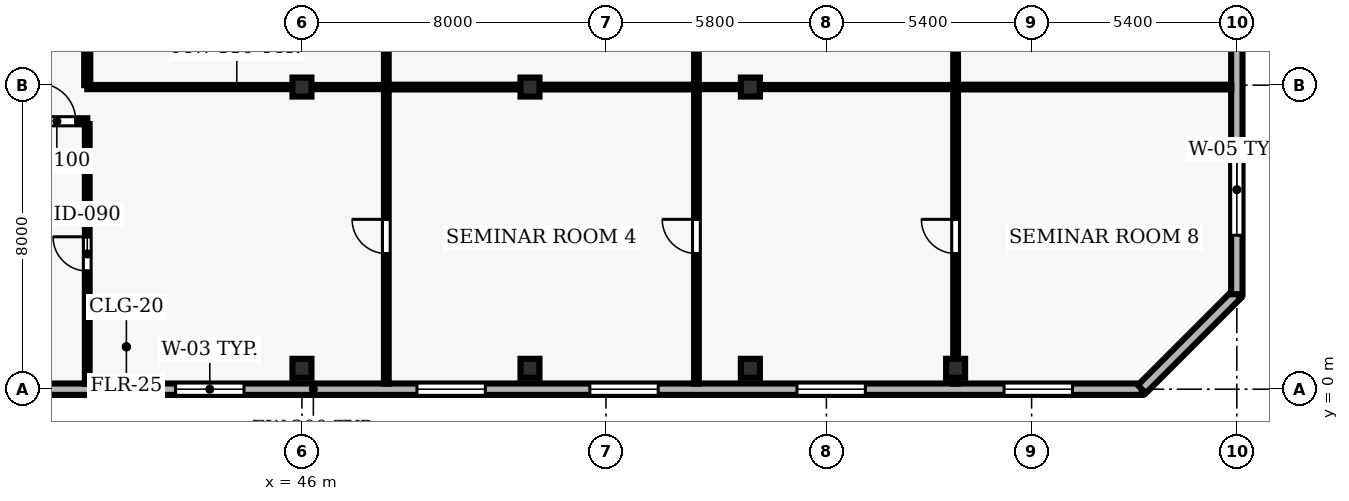
"""IFC4 building model, lengths in metres.
Left out: names, types, materials, properties, quantities, classifications, styles, units other than length and angle.
Written with IfcOpenShell. Run it as: python <this file> out.ifc"""

import sys

from ifc_helpers import new_model, si_unit, direction, frame, frame_2d, origin, origin_2d, place, context, subcontext, project, spatial, rectangle, hollow_rectangle, extrude, element, fill, save


model = new_model("IFC4")
c1 = context("Model", 3, precision=1e-05, world=origin(), true_north=direction((0.0, 1.0)))
c2 = subcontext(c1, "Body", "Model", "MODEL_VIEW")
j1 = project(units=[si_unit("LENGTHUNIT", "METRE"), si_unit("PLANEANGLEUNIT", "RADIAN")], contexts=[c1])
p1 = place(None, origin())
s1 = spatial("IfcSite", under=j1, at=p1, CompositionType="ELEMENT")
p2 = place(p1, origin())
s2 = spatial("IfcBuilding", under=s1, at=p2, CompositionType="ELEMENT")
p3 = place(p2, frame((0.0, 0.0, 158.0)))
s3 = spatial("IfcBuildingStorey", under=s2, at=p3, CompositionType="ELEMENT", Elevation=158.0)
for number, where, z_axis, x_axis in (
    (1, (46.0, 0.55, 0.0), (0.0, 0.0, 1.0), (1.0, 0.0, 0.0)),
    (2, (46.0, 7.95, 0.0), (0.0, 0.0, 1.0), (1.0, 0.0, 0.0)),
    (3, (52.0, 0.55, 0.0), (0.0, 0.0, 1.0), (1.0, 0.0, 0.0)),
    (4, (52.0, 7.95, 0.0), (0.0, 0.0, 1.0), (1.0, 0.0, 0.0)),
    (5, (57.8, 0.55, 0.0), (0.0, 0.0, 1.0), (1.0, 0.0, 0.0)),
    (6, (57.8, 7.95, 0.0), (0.0, 0.0, 1.0), (1.0, 0.0, 0.0)),
    (7, (63.2, 0.55, 0.0), (0.0, 0.0, 1.0), (1.0, 0.0, 0.0)),
):
    element("IfcColumn", number, at=place(p3, frame(where, z_axis=z_axis, x_axis=x_axis)), inside=s3, PredefinedType="COLUMN", context=c2, shape_type="SweptSolid", body=[
        extrude(hollow_rectangle(XDim=0.5, YDim=0.5, WallThickness=0.025, at=origin_2d()), origin(), (0.0, 0.0, 1.0), 3.9),
    ])
p4 = place(p3, frame((24.5, 0.0, 0.0), z_axis=(0.0, 0.0, 1.0), x_axis=(1.0, 0.0, 0.0)))
e8 = element("IfcWall", 8, at=p4, inside=s3, PredefinedType="SOLIDWALL", context=c2, shape_type="SweptSolid", body=[
    extrude(rectangle(XDim=43.6, YDim=0.3, at=frame_2d((21.8, 0.0))), origin(), (0.0, 0.0, 1.0), 3.69),
])
p5 = place(p4, frame((1.825, 0.0, 0.9)))
e9 = element("IfcOpeningElement", 9, at=p5, cuts=e8, PredefinedType="OPENING", context=c2, shape_type="SweptSolid", body=[
    extrude(rectangle(XDim=1.8, YDim=1.6, at=frame_2d((0.9, 0.8))), frame((0.0, 0.16, 0.0), z_axis=(0.0, -1.0, 0.0), x_axis=(1.0, 0.0, 0.0)), (0.0, 0.0, 1.0), 0.32),
])
p6 = place(p4, frame((8.175, 0.0, 0.9)))
e10 = element("IfcOpeningElement", 10, at=p6, cuts=e8, PredefinedType="OPENING", context=c2, shape_type="SweptSolid", body=[
    extrude(rectangle(XDim=1.8, YDim=1.6, at=frame_2d((0.9, 0.8))), frame((0.0, 0.16, 0.0), z_axis=(0.0, -1.0, 0.0), x_axis=(1.0, 0.0, 0.0)), (0.0, 0.0, 1.0), 0.32),
])
p7 = place(p4, frame((18.175, 0.0, 0.9)))
e11 = element("IfcOpeningElement", 11, at=p7, cuts=e8, PredefinedType="OPENING", context=c2, shape_type="SweptSolid", body=[
    extrude(rectangle(XDim=1.8, YDim=1.6, at=frame_2d((0.9, 0.8))), frame((0.0, 0.16, 0.0), z_axis=(0.0, -1.0, 0.0), x_axis=(1.0, 0.0, 0.0)), (0.0, 0.0, 1.0), 0.32),
])
p8 = place(p4, frame((24.525, 0.0, 0.9)))
e12 = element("IfcOpeningElement", 12, at=p8, cuts=e8, PredefinedType="OPENING", context=c2, shape_type="SweptSolid", body=[
    extrude(rectangle(XDim=1.8, YDim=1.6, at=frame_2d((0.9, 0.8))), frame((0.0, 0.16, 0.0), z_axis=(0.0, -1.0, 0.0), x_axis=(1.0, 0.0, 0.0)), (0.0, 0.0, 1.0), 0.32),
])
p9 = place(p4, frame((29.075, 0.0, 0.9)))
e13 = element("IfcOpeningElement", 13, at=p9, cuts=e8, PredefinedType="OPENING", context=c2, shape_type="SweptSolid", body=[
    extrude(rectangle(XDim=1.8, YDim=1.6, at=frame_2d((0.9, 0.8))), frame((0.0, 0.16, 0.0), z_axis=(0.0, -1.0, 0.0), x_axis=(1.0, 0.0, 0.0)), (0.0, 0.0, 1.0), 0.32),
])
p10 = place(p4, frame((34.525, 0.0, 0.9)))
e14 = element("IfcOpeningElement", 14, at=p10, cuts=e8, PredefinedType="OPENING", context=c2, shape_type="SweptSolid", body=[
    extrude(rectangle(XDim=1.8, YDim=1.6, at=frame_2d((0.9, 0.8))), frame((0.0, 0.16, 0.0), z_axis=(0.0, -1.0, 0.0), x_axis=(1.0, 0.0, 0.0)), (0.0, 0.0, 1.0), 0.32),
])
p11 = place(p4, frame((39.975, 0.0, 0.9)))
e15 = element("IfcOpeningElement", 15, at=p11, cuts=e8, PredefinedType="OPENING", context=c2, shape_type="SweptSolid", body=[
    extrude(rectangle(XDim=1.8, YDim=1.6, at=frame_2d((0.9, 0.8))), frame((0.0, 0.16, 0.0), z_axis=(0.0, -1.0, 0.0), x_axis=(1.0, 0.0, 0.0)), (0.0, 0.0, 1.0), 0.32),
])
p12 = place(p3, frame((68.1, 0.0, 0.0), z_axis=(0.0, 0.0, 1.0), x_axis=(0.707106781187, 0.707106781187, 0.0)))
e16 = element("IfcWall", 16, at=p12, inside=s3, PredefinedType="SOLIDWALL", context=c2, shape_type="SweptSolid", body=[
    extrude(rectangle(XDim=3.536, YDim=0.3, at=frame_2d((1.768, 0.0))), origin(), (0.0, 0.0, 1.0), 3.69),
])
p13 = place(p3, frame((70.6, 2.5, 0.0), z_axis=(0.0, 0.0, 1.0), x_axis=(0.0, 1.0, 0.0)))
e17 = element("IfcWall", 17, at=p13, inside=s3, PredefinedType="SOLIDWALL", context=c2, shape_type="SweptSolid", body=[
    extrude(rectangle(XDim=11.0, YDim=0.3, at=frame_2d((5.5, 0.0))), origin(), (0.0, 0.0, 1.0), 3.69),
])
p14 = place(p13, frame((1.55, 0.0, 0.9)))
e18 = element("IfcOpeningElement", 18, at=p14, cuts=e17, PredefinedType="OPENING", context=c2, shape_type="SweptSolid", body=[
    extrude(rectangle(XDim=2.4, YDim=1.6, at=frame_2d((1.2, 0.8))), frame((0.0, 0.16, 0.0), z_axis=(0.0, -1.0, 0.0), x_axis=(1.0, 0.0, 0.0)), (0.0, 0.0, 1.0), 0.32),
])
p15 = place(p13, frame((7.05, 0.0, 0.9)))
e19 = element("IfcOpeningElement", 19, at=p15, cuts=e17, PredefinedType="OPENING", context=c2, shape_type="SweptSolid", body=[
    extrude(rectangle(XDim=2.4, YDim=1.6, at=frame_2d((1.2, 0.8))), frame((0.0, 0.16, 0.0), z_axis=(0.0, -1.0, 0.0), x_axis=(1.0, 0.0, 0.0)), (0.0, 0.0, 1.0), 0.32),
])
p16 = place(p3, frame((38.05, 7.05, 0.0), z_axis=(0.0, 0.0, 1.0), x_axis=(1.0, 0.0, 0.0)))
e20 = element("IfcWall", 20, at=p16, inside=s3, PredefinedType="PARTITIONING", context=c2, shape_type="SweptSolid", body=[
    extrude(rectangle(XDim=2.3, YDim=0.16, at=frame_2d((1.15, 0.0))), origin(), (0.0, 0.0, 1.0), 3.69),
])
p17 = place(p16, frame((1.0, 0.0, 0.0)))
e21 = element("IfcOpeningElement", 21, at=p17, cuts=e20, PredefinedType="OPENING", context=c2, shape_type="SweptSolid", body=[
    extrude(rectangle(XDim=1.0, YDim=2.1, at=frame_2d((0.5, 1.05))), frame((0.0, 0.09, 0.0), z_axis=(0.0, -1.0, 0.0), x_axis=(1.0, 0.0, 0.0)), (0.0, 0.0, 1.0), 0.18),
])
p18 = place(p3, frame((48.22, 7.95, 0.0), z_axis=(0.0, 0.0, 1.0), x_axis=(-1.0, 0.0, 0.0)))
e22 = element("IfcWall", 22, at=p18, inside=s3, PredefinedType="MOVABLE", context=c2, shape_type="SweptSolid", body=[
    extrude(rectangle(XDim=7.87, YDim=0.11, at=frame_2d((3.935, 0.0))), origin(), (0.0, 0.0, 1.0), 3.074),
])
p19 = place(p3, frame((56.38, 7.95, 0.0), z_axis=(0.0, 0.0, 1.0), x_axis=(-1.0, 0.0, 0.0)))
e23 = element("IfcWall", 23, at=p19, inside=s3, PredefinedType="PARTITIONING", context=c2, shape_type="SweptSolid", body=[
    extrude(rectangle(XDim=8.16, YDim=0.125, at=frame_2d((4.08, 0.0))), origin(), (0.0, 0.0, 1.0), 3.074),
])
p20 = place(p3, frame((63.2, 7.95, 0.0), z_axis=(0.0, 0.0, 1.0), x_axis=(-1.0, 0.0, 0.0)))
e24 = element("IfcWall", 24, at=p20, inside=s3, PredefinedType="MOVABLE", context=c2, shape_type="SweptSolid", body=[
    extrude(rectangle(XDim=6.82, YDim=0.11, at=frame_2d((3.41, 0.0))), origin(), (0.0, 0.0, 1.0), 3.074),
])
p21 = place(p3, frame((70.455, 7.95, 0.0), z_axis=(0.0, 0.0, 1.0), x_axis=(-1.0, 0.0, 0.0)))
e25 = element("IfcWall", 25, at=p21, inside=s3, PredefinedType="PARTITIONING", context=c2, shape_type="SweptSolid", body=[
    extrude(rectangle(XDim=7.255, YDim=0.125, at=frame_2d((3.627, 0.0))), origin(), (0.0, 0.0, 1.0), 3.69),
])
p22 = place(p3, frame((40.35, 0.145, 0.0), z_axis=(0.0, 0.0, 1.0), x_axis=(0.0, 1.0, 0.0)))
e26 = element("IfcWall", 26, at=p22, inside=s3, PredefinedType="PARTITIONING", context=c2, shape_type="SweptSolid", body=[
    extrude(rectangle(XDim=6.83, YDim=0.125, at=frame_2d((3.415, 0.0))), origin(), (0.0, 0.0, 1.0), 3.69),
])
p23 = place(p22, frame((2.965, 0.0, 0.0)))
e27 = element("IfcOpeningElement", 27, at=p23, cuts=e26, PredefinedType="OPENING", context=c2, shape_type="SweptSolid", body=[
    extrude(rectangle(XDim=0.9, YDim=2.1, at=frame_2d((0.45, 1.05))), frame((0.0, 0.073, 0.0), z_axis=(0.0, -1.0, 0.0), x_axis=(1.0, 0.0, 0.0)), (0.0, 0.0, 1.0), 0.145),
])
p24 = place(p3, frame((40.35, 8.0, 0.0), z_axis=(0.0, 0.0, 1.0), x_axis=(0.0, 1.0, 0.0)))
e28 = element("IfcWall", 28, at=p24, inside=s3, PredefinedType="PARTITIONING", context=c2, shape_type="SweptSolid", body=[
    extrude(rectangle(XDim=5.575, YDim=0.16, at=frame_2d((2.788, 0.0))), origin(), (0.0, 0.0, 1.0), 3.69),
])
p25 = place(p3, frame((48.22, 0.145, 0.0), z_axis=(0.0, 0.0, 1.0), x_axis=(0.0, 1.0, 0.0)))
e29 = element("IfcWall", 29, at=p25, inside=s3, PredefinedType="PARTITIONING", context=c2, shape_type="SweptSolid", body=[
    extrude(rectangle(XDim=7.748, YDim=0.125, at=frame_2d((3.874, 0.0))), origin(), (0.0, 0.0, 1.0), 3.69),
])
p26 = place(p25, frame((3.424, 0.0, 0.0)))
e30 = element("IfcOpeningElement", 30, at=p26, cuts=e29, PredefinedType="OPENING", context=c2, shape_type="SweptSolid", body=[
    extrude(rectangle(XDim=0.9, YDim=2.1, at=frame_2d((0.45, 1.05))), frame((0.0, 0.073, 0.0), z_axis=(0.0, -1.0, 0.0), x_axis=(1.0, 0.0, 0.0)), (0.0, 0.0, 1.0), 0.145),
])
p27 = place(p3, frame((48.22, 8.008, 0.0), z_axis=(0.0, 0.0, 1.0), x_axis=(0.0, 1.0, 0.0)))
e31 = element("IfcWall", 31, at=p27, inside=s3, PredefinedType="PARTITIONING", context=c2, shape_type="SweptSolid", body=[
    extrude(rectangle(XDim=5.567, YDim=0.125, at=frame_2d((2.783, 0.0))), origin(), (0.0, 0.0, 1.0), 3.69),
])
p28 = place(p3, frame((56.38, 0.145, 0.0), z_axis=(0.0, 0.0, 1.0), x_axis=(0.0, 1.0, 0.0)))
e32 = element("IfcWall", 32, at=p28, inside=s3, PredefinedType="PARTITIONING", context=c2, shape_type="SweptSolid", body=[
    extrude(rectangle(XDim=7.748, YDim=0.125, at=frame_2d((3.874, 0.0))), origin(), (0.0, 0.0, 1.0), 3.69),
])
p29 = place(p28, frame((3.424, 0.0, 0.0)))
e33 = element("IfcOpeningElement", 33, at=p29, cuts=e32, PredefinedType="OPENING", context=c2, shape_type="SweptSolid", body=[
    extrude(rectangle(XDim=0.9, YDim=2.1, at=frame_2d((0.45, 1.05))), frame((0.0, 0.073, 0.0), z_axis=(0.0, -1.0, 0.0), x_axis=(1.0, 0.0, 0.0)), (0.0, 0.0, 1.0), 0.145),
])
p30 = place(p3, frame((56.38, 8.008, 0.0), z_axis=(0.0, 0.0, 1.0), x_axis=(0.0, 1.0, 0.0)))
e34 = element("IfcWall", 34, at=p30, inside=s3, PredefinedType="PARTITIONING", context=c2, shape_type="SweptSolid", body=[
    extrude(rectangle(XDim=5.567, YDim=0.125, at=frame_2d((2.783, 0.0))), origin(), (0.0, 0.0, 1.0), 3.69),
])
p31 = place(p3, frame((63.2, 0.145, 0.0), z_axis=(0.0, 0.0, 1.0), x_axis=(0.0, 1.0, 0.0)))
e35 = element("IfcWall", 35, at=p31, inside=s3, PredefinedType="PARTITIONING", context=c2, shape_type="SweptSolid", body=[
    extrude(rectangle(XDim=7.748, YDim=0.125, at=frame_2d((3.874, 0.0))), origin(), (0.0, 0.0, 1.0), 3.074),
])
p32 = place(p31, frame((3.424, 0.0, 0.0)))
e36 = element("IfcOpeningElement", 36, at=p32, cuts=e35, PredefinedType="OPENING", context=c2, shape_type="SweptSolid", body=[
    extrude(rectangle(XDim=0.9, YDim=2.1, at=frame_2d((0.45, 1.05))), frame((0.0, 0.073, 0.0), z_axis=(0.0, -1.0, 0.0), x_axis=(1.0, 0.0, 0.0)), (0.0, 0.0, 1.0), 0.145),
])
p33 = place(p3, frame((63.2, 8.008, 0.0), z_axis=(0.0, 0.0, 1.0), x_axis=(0.0, 1.0, 0.0)))
e37 = element("IfcWall", 37, at=p33, inside=s3, PredefinedType="PARTITIONING", context=c2, shape_type="SweptSolid", body=[
    extrude(rectangle(XDim=5.567, YDim=0.125, at=frame_2d((2.783, 0.0))), origin(), (0.0, 0.0, 1.0), 3.074),
])
p34 = place(p7, origin())
e38 = element("IfcWindow", 38, at=p34, inside=s3, PartitioningType="SINGLE_PANEL", PredefinedType="WINDOW", context=c2, shape_type="SweptSolid", body=[
    extrude(rectangle(XDim=1.8, YDim=1.6, at=frame_2d((0.9, 0.8))), frame((0.0, 0.03, 0.0), z_axis=(0.0, -1.0, 0.0), x_axis=(1.0, 0.0, 0.0)), (0.0, 0.0, 1.0), 0.06),
])
fill(e11, e38)
p35 = place(p8, origin())
e39 = element("IfcWindow", 39, at=p35, inside=s3, PartitioningType="SINGLE_PANEL", PredefinedType="WINDOW", context=c2, shape_type="SweptSolid", body=[
    extrude(rectangle(XDim=1.8, YDim=1.6, at=frame_2d((0.9, 0.8))), frame((0.0, 0.03, 0.0), z_axis=(0.0, -1.0, 0.0), x_axis=(1.0, 0.0, 0.0)), (0.0, 0.0, 1.0), 0.06),
])
fill(e12, e39)
p36 = place(p9, origin())
e40 = element("IfcWindow", 40, at=p36, inside=s3, PartitioningType="SINGLE_PANEL", PredefinedType="WINDOW", context=c2, shape_type="SweptSolid", body=[
    extrude(rectangle(XDim=1.8, YDim=1.6, at=frame_2d((0.9, 0.8))), frame((0.0, 0.03, 0.0), z_axis=(0.0, -1.0, 0.0), x_axis=(1.0, 0.0, 0.0)), (0.0, 0.0, 1.0), 0.06),
])
fill(e13, e40)
p37 = place(p10, origin())
e41 = element("IfcWindow", 41, at=p37, inside=s3, PartitioningType="SINGLE_PANEL", PredefinedType="WINDOW", context=c2, shape_type="SweptSolid", body=[
    extrude(rectangle(XDim=1.8, YDim=1.6, at=frame_2d((0.9, 0.8))), frame((0.0, 0.03, 0.0), z_axis=(0.0, -1.0, 0.0), x_axis=(1.0, 0.0, 0.0)), (0.0, 0.0, 1.0), 0.06),
])
fill(e14, e41)
p38 = place(p11, origin())
e42 = element("IfcWindow", 42, at=p38, inside=s3, PartitioningType="SINGLE_PANEL", PredefinedType="WINDOW", context=c2, shape_type="SweptSolid", body=[
    extrude(rectangle(XDim=1.8, YDim=1.6, at=frame_2d((0.9, 0.8))), frame((0.0, 0.03, 0.0), z_axis=(0.0, -1.0, 0.0), x_axis=(1.0, 0.0, 0.0)), (0.0, 0.0, 1.0), 0.06),
])
fill(e15, e42)
p39 = place(p14, origin())
e43 = element("IfcWindow", 43, at=p39, inside=s3, PartitioningType="SINGLE_PANEL", PredefinedType="WINDOW", context=c2, shape_type="SweptSolid", body=[
    extrude(rectangle(XDim=2.4, YDim=1.6, at=frame_2d((1.2, 0.8))), frame((0.0, 0.03, 0.0), z_axis=(0.0, -1.0, 0.0), x_axis=(1.0, 0.0, 0.0)), (0.0, 0.0, 1.0), 0.06),
])
fill(e18, e43)
p40 = place(p17, origin())
e44 = element("IfcDoor", 44, at=p40, inside=s3, OperationType="SINGLE_SWING_LEFT", PredefinedType="DOOR", context=c2, shape_type="SweptSolid", body=[
    extrude(rectangle(XDim=1.0, YDim=2.1, at=frame_2d((0.5, 1.05))), frame((0.0, 0.025, 0.0), z_axis=(0.0, -1.0, 0.0), x_axis=(1.0, 0.0, 0.0)), (0.0, 0.0, 1.0), 0.05),
])
fill(e21, e44)
p41 = place(p23, origin())
e45 = element("IfcDoor", 45, at=p41, inside=s3, OperationType="SINGLE_SWING_RIGHT", PredefinedType="DOOR", context=c2, shape_type="SweptSolid", body=[
    extrude(rectangle(XDim=0.9, YDim=2.1, at=frame_2d((0.45, 1.05))), frame((0.0, 0.025, 0.0), z_axis=(0.0, -1.0, 0.0), x_axis=(1.0, 0.0, 0.0)), (0.0, 0.0, 1.0), 0.05),
])
fill(e27, e45)
p42 = place(p26, origin())
e46 = element("IfcDoor", 46, at=p42, inside=s3, OperationType="SINGLE_SWING_RIGHT", PredefinedType="DOOR", context=c2, shape_type="SweptSolid", body=[
    extrude(rectangle(XDim=0.9, YDim=2.1, at=frame_2d((0.45, 1.05))), frame((0.0, 0.025, 0.0), z_axis=(0.0, -1.0, 0.0), x_axis=(1.0, 0.0, 0.0)), (0.0, 0.0, 1.0), 0.05),
])
fill(e30, e46)
p43 = place(p29, origin())
e47 = element("IfcDoor", 47, at=p43, inside=s3, OperationType="SINGLE_SWING_RIGHT", PredefinedType="DOOR", context=c2, shape_type="SweptSolid", body=[
    extrude(rectangle(XDim=0.9, YDim=2.1, at=frame_2d((0.45, 1.05))), frame((0.0, 0.025, 0.0), z_axis=(0.0, -1.0, 0.0), x_axis=(1.0, 0.0, 0.0)), (0.0, 0.0, 1.0), 0.05),
])
fill(e33, e47)
p44 = place(p32, origin())
e48 = element("IfcDoor", 48, at=p44, inside=s3, OperationType="SINGLE_SWING_RIGHT", PredefinedType="DOOR", context=c2, shape_type="SweptSolid", body=[
    extrude(rectangle(XDim=0.9, YDim=2.1, at=frame_2d((0.45, 1.05))), frame((0.0, 0.025, 0.0), z_axis=(0.0, -1.0, 0.0), x_axis=(1.0, 0.0, 0.0)), (0.0, 0.0, 1.0), 0.05),
])
fill(e36, e48)
save(model, sys.argv[1])
